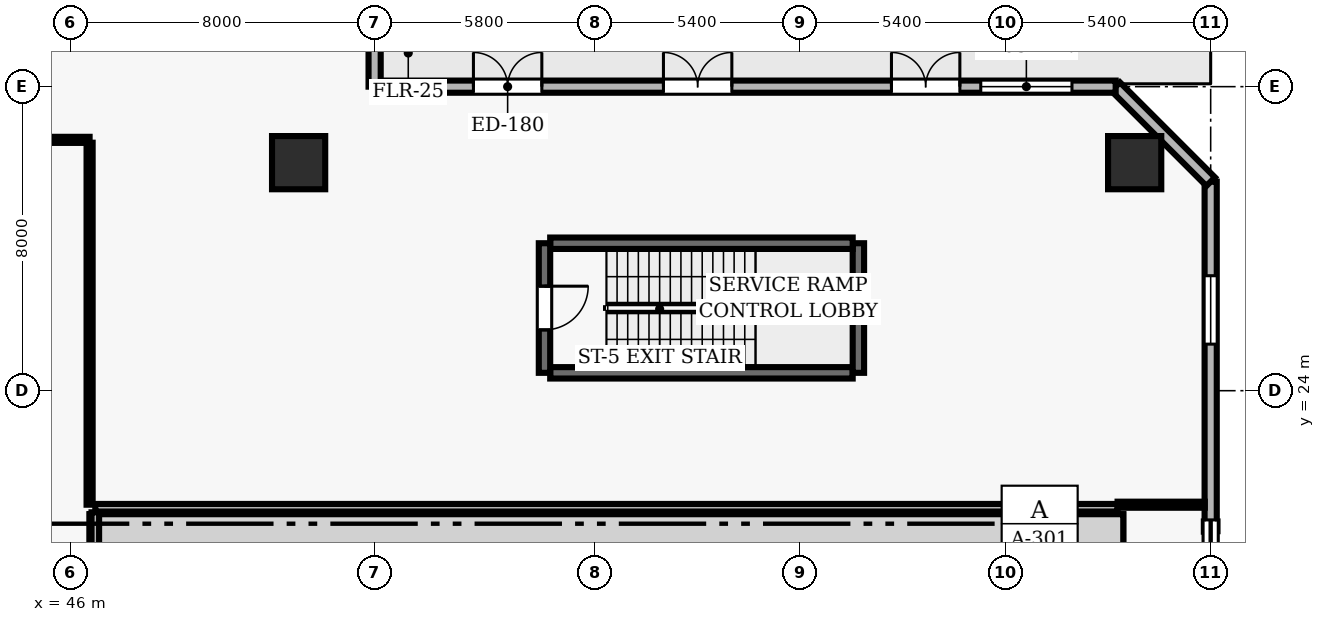
"""IFC4 building model, lengths in metres.
Left out: names, types, materials, properties, quantities, classifications, styles, units other than length and angle.
Written with IfcOpenShell. Run it as: python <this file> out.ifc"""

import sys

from ifc_helpers import new_model, si_unit, direction, frame, frame_2d, origin, origin_2d, place, context, subcontext, project, spatial, rectangle, extrude, element, fill, save


model = new_model("IFC4")
c1 = context("Model", 3, precision=1e-05, world=origin(), true_north=direction((0.0, 1.0)))
c2 = subcontext(c1, "Body", "Model", "MODEL_VIEW")
j1 = project(units=[si_unit("LENGTHUNIT", "METRE"), si_unit("PLANEANGLEUNIT", "RADIAN")], contexts=[c1])
p1 = place(None, origin())
s1 = spatial("IfcSite", under=j1, at=p1, CompositionType="ELEMENT")
p2 = place(p1, origin())
s2 = spatial("IfcBuilding", under=s1, at=p2, CompositionType="ELEMENT")
p3 = place(p2, origin())
s3 = spatial("IfcBuildingStorey", under=s2, at=p3, CompositionType="ELEMENT", Elevation=0.0)
for number, where, z_axis, x_axis in (
    (1, (52.0, 30.0, 0.0), (0.0, 0.0, 1.0), (1.0, 0.0, 0.0)),
    (2, (74.0, 30.0, 0.0), (0.0, 0.0, 1.0), (1.0, 0.0, 0.0)),
):
    element("IfcColumn", number, at=place(p3, frame(where, z_axis=z_axis, x_axis=x_axis)), inside=s3, PredefinedType="COLUMN", context=c2, shape_type="SweptSolid", body=[
        extrude(rectangle(XDim=1.4, YDim=1.4, at=origin_2d()), origin(), (0.0, 0.0, 1.0), 5.2),
    ])
p4 = place(p3, frame((76.0, 2.5, 0.0), z_axis=(0.0, 0.0, 1.0), x_axis=(0.0, 1.0, 0.0)))
e3 = element("IfcWall", 3, at=p4, inside=s3, PredefinedType="SOLIDWALL", context=c2, shape_type="SweptSolid", body=[
    extrude(rectangle(XDim=27.0, YDim=0.32, at=frame_2d((13.5, 0.0))), origin(), (0.0, 0.0, 1.0), 4.92),
])
p5 = place(p4, frame((14.1, 0.0, 0.0)))
e4 = element("IfcOpeningElement", 4, at=p5, cuts=e3, PredefinedType="OPENING", context=c2, shape_type="SweptSolid", body=[
    extrude(rectangle(XDim=4.0, YDim=2.8, at=frame_2d((2.0, 1.4))), frame((0.0, 0.17, 0.0), z_axis=(0.0, -1.0, 0.0), x_axis=(1.0, 0.0, 0.0)), (0.0, 0.0, 1.0), 0.34),
])
p6 = place(p4, frame((2.025, 0.0, 0.9)))
e5 = element("IfcOpeningElement", 5, at=p6, cuts=e3, PredefinedType="OPENING", context=c2, shape_type="SweptSolid", body=[
    extrude(rectangle(XDim=1.8, YDim=1.6, at=frame_2d((0.9, 0.8))), frame((0.0, 0.17, 0.0), z_axis=(0.0, -1.0, 0.0), x_axis=(1.0, 0.0, 0.0)), (0.0, 0.0, 1.0), 0.34),
])
p7 = place(p4, frame((9.225, 0.0, 0.9)))
e6 = element("IfcOpeningElement", 6, at=p7, cuts=e3, PredefinedType="OPENING", context=c2, shape_type="SweptSolid", body=[
    extrude(rectangle(XDim=1.8, YDim=1.6, at=frame_2d((0.9, 0.8))), frame((0.0, 0.17, 0.0), z_axis=(0.0, -1.0, 0.0), x_axis=(1.0, 0.0, 0.0)), (0.0, 0.0, 1.0), 0.34),
])
p8 = place(p4, frame((22.725, 0.0, 0.9)))
e7 = element("IfcOpeningElement", 7, at=p8, cuts=e3, PredefinedType="OPENING", context=c2, shape_type="SweptSolid", body=[
    extrude(rectangle(XDim=1.8, YDim=1.6, at=frame_2d((0.9, 0.8))), frame((0.0, 0.17, 0.0), z_axis=(0.0, -1.0, 0.0), x_axis=(1.0, 0.0, 0.0)), (0.0, 0.0, 1.0), 0.34),
])
p9 = place(p3, frame((76.0, 29.5, 0.0), z_axis=(0.0, 0.0, 1.0), x_axis=(-0.707106781187, 0.707106781187, 0.0)))
e8 = element("IfcWall", 8, at=p9, inside=s3, PredefinedType="SOLIDWALL", context=c2, shape_type="SweptSolid", body=[
    extrude(rectangle(XDim=3.536, YDim=0.32, at=frame_2d((1.768, 0.0))), origin(), (0.0, 0.0, 1.0), 4.92),
])
p10 = place(p3, frame((73.5, 32.0, 0.0), z_axis=(0.0, 0.0, 1.0), x_axis=(-1.0, 0.0, 0.0)))
e9 = element("IfcWall", 9, at=p10, inside=s3, PredefinedType="SOLIDWALL", context=c2, shape_type="SweptSolid", body=[
    extrude(rectangle(XDim=19.5, YDim=0.32, at=frame_2d((9.75, 0.0))), origin(), (0.0, 0.0, 1.0), 4.92),
])
p11 = place(p10, frame((15.1, 0.0, 0.0)))
e10 = element("IfcOpeningElement", 10, at=p11, cuts=e9, PredefinedType="OPENING", context=c2, shape_type="SweptSolid", body=[
    extrude(rectangle(XDim=1.8, YDim=2.4, at=frame_2d((0.9, 1.2))), frame((0.0, 0.17, 0.0), z_axis=(0.0, -1.0, 0.0), x_axis=(1.0, 0.0, 0.0)), (0.0, 0.0, 1.0), 0.34),
])
p12 = place(p10, frame((10.1, 0.0, 0.0)))
e11 = element("IfcOpeningElement", 11, at=p12, cuts=e9, PredefinedType="OPENING", context=c2, shape_type="SweptSolid", body=[
    extrude(rectangle(XDim=1.8, YDim=2.4, at=frame_2d((0.9, 1.2))), frame((0.0, 0.17, 0.0), z_axis=(0.0, -1.0, 0.0), x_axis=(1.0, 0.0, 0.0)), (0.0, 0.0, 1.0), 0.34),
])
p13 = place(p10, frame((4.1, 0.0, 0.0)))
e12 = element("IfcOpeningElement", 12, at=p13, cuts=e9, PredefinedType="OPENING", context=c2, shape_type="SweptSolid", body=[
    extrude(rectangle(XDim=1.8, YDim=2.4, at=frame_2d((0.9, 1.2))), frame((0.0, 0.17, 0.0), z_axis=(0.0, -1.0, 0.0), x_axis=(1.0, 0.0, 0.0)), (0.0, 0.0, 1.0), 0.34),
])
p14 = place(p10, frame((1.15, 0.0, 0.9)))
e13 = element("IfcOpeningElement", 13, at=p14, cuts=e9, PredefinedType="OPENING", context=c2, shape_type="SweptSolid", body=[
    extrude(rectangle(XDim=2.4, YDim=1.6, at=frame_2d((1.2, 0.8))), frame((0.0, 0.17, 0.0), z_axis=(0.0, -1.0, 0.0), x_axis=(1.0, 0.0, 0.0)), (0.0, 0.0, 1.0), 0.34),
])
p15 = place(p3, frame((54.0, 32.0, 0.0), z_axis=(0.0, 0.0, 1.0), x_axis=(0.0, 1.0, 0.0)))
e14 = element("IfcWall", 14, at=p15, inside=s3, PredefinedType="SOLIDWALL", context=c2, shape_type="SweptSolid", body=[
    extrude(rectangle(XDim=19.5, YDim=0.32, at=frame_2d((9.75, 0.0))), origin(), (0.0, 0.0, 1.0), 4.92),
])
p16 = place(p15, frame((1.3, 0.0, 0.0)))
e15 = element("IfcOpeningElement", 15, at=p16, cuts=e14, PredefinedType="OPENING", context=c2, shape_type="SweptSolid", body=[
    extrude(rectangle(XDim=1.8, YDim=2.4, at=frame_2d((0.9, 1.2))), frame((0.0, 0.17, 0.0), z_axis=(0.0, -1.0, 0.0), x_axis=(1.0, 0.0, 0.0)), (0.0, 0.0, 1.0), 0.34),
])
p17 = place(p15, frame((15.3, 0.0, 0.0)))
e16 = element("IfcOpeningElement", 16, at=p17, cuts=e14, PredefinedType="OPENING", context=c2, shape_type="SweptSolid", body=[
    extrude(rectangle(XDim=1.8, YDim=2.4, at=frame_2d((0.9, 1.2))), frame((0.0, 0.17, 0.0), z_axis=(0.0, -1.0, 0.0), x_axis=(1.0, 0.0, 0.0)), (0.0, 0.0, 1.0), 0.34),
])
p18 = place(p15, frame((9.0, 0.0, 0.9)))
e17 = element("IfcOpeningElement", 17, at=p18, cuts=e14, PredefinedType="OPENING", context=c2, shape_type="SweptSolid", body=[
    extrude(rectangle(XDim=1.5, YDim=1.8, at=frame_2d((0.75, 0.9))), frame((0.0, 0.17, 0.0), z_axis=(0.0, -1.0, 0.0), x_axis=(1.0, 0.0, 0.0)), (0.0, 0.0, 1.0), 0.34),
])
p19 = place(p3, frame((58.62, 24.47, 0.0), z_axis=(0.0, 0.0, 1.0), x_axis=(1.0, 0.0, 0.0)))
e18 = element("IfcWall", 18, at=p19, inside=s3, PredefinedType="SHEAR", context=c2, shape_type="SweptSolid", body=[
    extrude(rectangle(XDim=7.96, YDim=0.3, at=frame_2d((3.98, 0.0))), origin(), (0.0, 0.0, 1.0), 4.92),
])
p20 = place(p3, frame((66.73, 24.47, 0.0), z_axis=(0.0, 0.0, 1.0), x_axis=(0.0, 1.0, 0.0)))
e19 = element("IfcWall", 19, at=p20, inside=s3, PredefinedType="SHEAR", context=c2, shape_type="SweptSolid", body=[
    extrude(rectangle(XDim=3.41, YDim=0.3, at=frame_2d((1.705, 0.0))), origin(), (0.0, 0.0, 1.0), 4.92),
])
p21 = place(p3, frame((66.58, 27.88, 0.0), z_axis=(0.0, 0.0, 1.0), x_axis=(-1.0, 0.0, 0.0)))
e20 = element("IfcWall", 20, at=p21, inside=s3, PredefinedType="SHEAR", context=c2, shape_type="SweptSolid", body=[
    extrude(rectangle(XDim=7.96, YDim=0.3, at=frame_2d((3.98, 0.0))), origin(), (0.0, 0.0, 1.0), 4.92),
])
p22 = place(p3, frame((58.47, 27.88, 0.0), z_axis=(0.0, 0.0, 1.0), x_axis=(0.0, -1.0, 0.0)))
e21 = element("IfcWall", 21, at=p22, inside=s3, PredefinedType="SHEAR", context=c2, shape_type="SweptSolid", body=[
    extrude(rectangle(XDim=3.41, YDim=0.3, at=frame_2d((1.705, 0.0))), origin(), (0.0, 0.0, 1.0), 4.92),
])
p23 = place(p22, frame((1.13, 0.0, 0.0)))
e22 = element("IfcOpeningElement", 22, at=p23, cuts=e21, PredefinedType="OPENING", context=c2, shape_type="SweptSolid", body=[
    extrude(rectangle(XDim=1.15, YDim=2.15, at=frame_2d((0.575, 1.075))), frame((0.0, 0.16, 0.0), z_axis=(0.0, -1.0, 0.0), x_axis=(1.0, 0.0, 0.0)), (0.0, 0.0, 1.0), 0.32),
])
p24 = place(p3, frame((46.65, 20.92, 0.0), z_axis=(0.0, 0.0, 1.0), x_axis=(1.0, 0.0, 0.0)))
e23 = element("IfcWall", 23, at=p24, inside=s3, PredefinedType="SOLIDWALL", context=c2, shape_type="SweptSolid", body=[
    extrude(rectangle(XDim=26.9, YDim=0.2, at=frame_2d((13.45, 0.0))), origin(), (0.0, 0.0, 1.0), 4.92),
])
p25 = place(p3, frame((46.65, 16.4, 0.0), z_axis=(0.0, 0.0, 1.0), x_axis=(0.0, 1.0, 0.0)))
e24 = element("IfcWall", 24, at=p25, inside=s3, PredefinedType="SOLIDWALL", context=c2, shape_type="SweptSolid", body=[
    extrude(rectangle(XDim=4.4, YDim=0.2, at=frame_2d((2.2, 0.0))), origin(), (0.0, 0.0, 1.0), 4.92),
])
p26 = place(p3, frame((38.3, 30.6, 0.0), z_axis=(0.0, 0.0, 1.0), x_axis=(1.0, 0.0, 0.0)))
e25 = element("IfcWall", 25, at=p26, inside=s3, PredefinedType="PARTITIONING", context=c2, shape_type="SweptSolid", body=[
    extrude(rectangle(XDim=8.2, YDim=0.16, at=frame_2d((4.1, 0.0))), origin(), (0.0, 0.0, 1.0), 4.92),
])
p27 = place(p3, frame((73.55, 21.0, 0.0), z_axis=(0.0, 0.0, 1.0), x_axis=(1.0, 0.0, 0.0)))
e26 = element("IfcWall", 26, at=p27, inside=s3, PredefinedType="PARTITIONING", context=c2, shape_type="SweptSolid", body=[
    extrude(rectangle(XDim=2.295, YDim=0.16, at=frame_2d((1.147, 0.0))), origin(), (0.0, 0.0, 1.0), 4.92),
])
p28 = place(p3, frame((46.5, 30.525, 0.0), z_axis=(0.0, 0.0, 1.0), x_axis=(0.0, -1.0, 0.0)))
e27 = element("IfcWall", 27, at=p28, inside=s3, PredefinedType="PARTITIONING", context=c2, shape_type="SweptSolid", body=[
    extrude(rectangle(XDim=9.525, YDim=0.16, at=frame_2d((4.762, 0.0))), origin(), (0.0, 0.0, 1.0), 4.451),
])
p29 = place(p5, origin())
e28 = element("IfcDoor", 28, at=p29, inside=s3, OperationType="ROLLINGUP", PredefinedType="GATE", context=c2, shape_type="SweptSolid", body=[
    extrude(rectangle(XDim=4.0, YDim=2.8, at=frame_2d((2.0, 1.4))), frame((0.0, 0.025, 0.0), z_axis=(0.0, -1.0, 0.0), x_axis=(1.0, 0.0, 0.0)), (0.0, 0.0, 1.0), 0.05),
])
fill(e4, e28)
p30 = place(p8, origin())
e29 = element("IfcWindow", 29, at=p30, inside=s3, PartitioningType="SINGLE_PANEL", PredefinedType="WINDOW", context=c2, shape_type="SweptSolid", body=[
    extrude(rectangle(XDim=1.8, YDim=1.6, at=frame_2d((0.9, 0.8))), frame((0.0, 0.03, 0.0), z_axis=(0.0, -1.0, 0.0), x_axis=(1.0, 0.0, 0.0)), (0.0, 0.0, 1.0), 0.06),
])
fill(e7, e29)
p31 = place(p11, origin())
e30 = element("IfcDoor", 30, at=p31, inside=s3, OperationType="DOUBLE_DOOR_SINGLE_SWING", PredefinedType="DOOR", context=c2, shape_type="SweptSolid", body=[
    extrude(rectangle(XDim=1.8, YDim=2.4, at=frame_2d((0.9, 1.2))), frame((0.0, 0.025, 0.0), z_axis=(0.0, -1.0, 0.0), x_axis=(1.0, 0.0, 0.0)), (0.0, 0.0, 1.0), 0.05),
])
fill(e10, e30)
p32 = place(p12, origin())
e31 = element("IfcDoor", 31, at=p32, inside=s3, OperationType="DOUBLE_DOOR_SINGLE_SWING", PredefinedType="DOOR", context=c2, shape_type="SweptSolid", body=[
    extrude(rectangle(XDim=1.8, YDim=2.4, at=frame_2d((0.9, 1.2))), frame((0.0, 0.025, 0.0), z_axis=(0.0, -1.0, 0.0), x_axis=(1.0, 0.0, 0.0)), (0.0, 0.0, 1.0), 0.05),
])
fill(e11, e31)
p33 = place(p13, origin())
e32 = element("IfcDoor", 32, at=p33, inside=s3, OperationType="DOUBLE_DOOR_SINGLE_SWING", PredefinedType="DOOR", context=c2, shape_type="SweptSolid", body=[
    extrude(rectangle(XDim=1.8, YDim=2.4, at=frame_2d((0.9, 1.2))), frame((0.0, 0.025, 0.0), z_axis=(0.0, -1.0, 0.0), x_axis=(1.0, 0.0, 0.0)), (0.0, 0.0, 1.0), 0.05),
])
fill(e12, e32)
p34 = place(p14, origin())
e33 = element("IfcWindow", 33, at=p34, inside=s3, PartitioningType="SINGLE_PANEL", PredefinedType="WINDOW", context=c2, shape_type="SweptSolid", body=[
    extrude(rectangle(XDim=2.4, YDim=1.6, at=frame_2d((1.2, 0.8))), frame((0.0, 0.03, 0.0), z_axis=(0.0, -1.0, 0.0), x_axis=(1.0, 0.0, 0.0)), (0.0, 0.0, 1.0), 0.06),
])
fill(e13, e33)
p35 = place(p23, origin())
e34 = element("IfcDoor", 34, at=p35, inside=s3, OperationType="SINGLE_SWING_LEFT", PredefinedType="DOOR", context=c2, shape_type="SweptSolid", body=[
    extrude(rectangle(XDim=1.15, YDim=2.15, at=frame_2d((0.575, 1.075))), frame((0.0, 0.025, 0.0), z_axis=(0.0, -1.0, 0.0), x_axis=(1.0, 0.0, 0.0)), (0.0, 0.0, 1.0), 0.05),
])
fill(e22, e34)
save(model, sys.argv[1])
